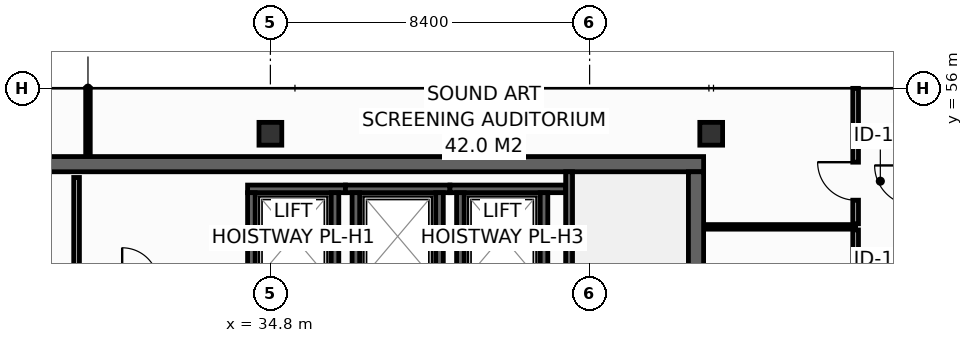
"""IFC4 building model, lengths in metres.
Left out: names, types, materials, properties, quantities, classifications, styles, units other than length and angle.
Written with IfcOpenShell. Run it as: python <this file> out.ifc"""

import sys

from ifc_helpers import new_model, si_unit, direction, frame, frame_2d, origin, origin_2d, place, context, subcontext, project, spatial, rectangle, hollow_rectangle, extrude, element, fill, save


model = new_model("IFC4")
c1 = context("Model", 3, precision=1e-05, world=origin(), true_north=direction((0.0, 1.0)))
c2 = subcontext(c1, "Body", "Model", "MODEL_VIEW")
j1 = project(units=[si_unit("LENGTHUNIT", "METRE"), si_unit("PLANEANGLEUNIT", "RADIAN")], contexts=[c1])
p1 = place(None, origin())
s1 = spatial("IfcSite", under=j1, at=p1, CompositionType="ELEMENT")
p2 = place(p1, origin())
s2 = spatial("IfcBuilding", under=s1, at=p2, CompositionType="ELEMENT")
p3 = place(p2, frame((0.0, 0.0, 287.6)))
s3 = spatial("IfcBuildingStorey", under=s2, at=p3, CompositionType="ELEMENT", Elevation=287.6)
p4 = place(p3, frame((13.7, 54.0, 0.0), z_axis=(0.0, 0.0, 1.0), x_axis=(1.0, 0.0, 0.0)))
e1 = element("IfcWall", 1, at=p4, inside=s3, PredefinedType="SHEAR", context=c2, shape_type="SweptSolid", body=[
    extrude(rectangle(XDim=32.5, YDim=0.4, at=frame_2d((16.25, 0.0))), origin(), (0.0, 0.0, 1.0), 3.55),
])
p5 = place(p3, frame((46.0, 43.4, 0.0), z_axis=(0.0, 0.0, 1.0), x_axis=(0.0, 1.0, 0.0)))
e2 = element("IfcWall", 2, at=p5, inside=s3, PredefinedType="SHEAR", context=c2, shape_type="SweptSolid", body=[
    extrude(rectangle(XDim=10.4, YDim=0.4, at=frame_2d((5.2, 0.0))), origin(), (0.0, 0.0, 1.0), 3.55),
])
for number, where, z_axis, x_axis in (
    (3, (34.8, 54.8, 0.0), (0.0, 0.0, 1.0), (1.0, 0.0, 0.0)),
    (4, (46.4, 54.8, 0.0), (0.0, 0.0, 1.0), (1.0, 0.0, 0.0)),
):
    element("IfcColumn", number, at=place(p3, frame(where, z_axis=z_axis, x_axis=x_axis)), inside=s3, PredefinedType="COLUMN", context=c2, shape_type="SweptSolid", body=[
        extrude(hollow_rectangle(XDim=0.6, YDim=0.6, WallThickness=0.028, at=origin_2d()), origin(), (0.0, 0.0, 1.0), 3.8),
    ])
p6 = place(p3, frame((34.2, 53.35, 0.0), z_axis=(0.0, 0.0, 1.0), x_axis=(1.0, 0.0, 0.0)))
e5 = element("IfcWall", 5, at=p6, inside=s3, PredefinedType="SHEAR", context=c2, shape_type="SweptSolid", body=[
    extrude(rectangle(XDim=2.575, YDim=0.2, at=frame_2d((1.288, 0.0))), origin(), (0.0, 0.0, 1.0), 3.55),
])
for number, where, z_axis, x_axis in (
    (6, (34.3, 50.95, 0.0), (0.0, 0.0, 1.0), (0.0, 1.0, 0.0)),
    (7, (36.5, 50.95, 0.0), (0.0, 0.0, 1.0), (0.0, 1.0, 0.0)),
):
    element("IfcWall", number, at=place(p3, frame(where, z_axis=z_axis, x_axis=x_axis)), inside=s3, PredefinedType="SHEAR", context=c2, shape_type="SweptSolid", body=[
        extrude(rectangle(XDim=2.3, YDim=0.2, at=frame_2d((1.15, 0.0))), origin(), (0.0, 0.0, 1.0), 3.55),
    ])
p7 = place(p3, frame((36.775, 53.35, 0.0), z_axis=(0.0, 0.0, 1.0), x_axis=(1.0, 0.0, 0.0)))
e8 = element("IfcWall", 8, at=p7, inside=s3, PredefinedType="SHEAR", context=c2, shape_type="SweptSolid", body=[
    extrude(rectangle(XDim=2.75, YDim=0.2, at=frame_2d((1.375, 0.0))), origin(), (0.0, 0.0, 1.0), 3.55),
])
for number, where, z_axis, x_axis in (
    (9, (37.05, 50.95, 0.0), (0.0, 0.0, 1.0), (0.0, 1.0, 0.0)),
    (10, (39.25, 50.95, 0.0), (0.0, 0.0, 1.0), (0.0, 1.0, 0.0)),
):
    element("IfcWall", number, at=place(p3, frame(where, z_axis=z_axis, x_axis=x_axis)), inside=s3, PredefinedType="SHEAR", context=c2, shape_type="SweptSolid", body=[
        extrude(rectangle(XDim=2.3, YDim=0.2, at=frame_2d((1.15, 0.0))), origin(), (0.0, 0.0, 1.0), 3.55),
    ])
p8 = place(p3, frame((39.525, 53.35, 0.0), z_axis=(0.0, 0.0, 1.0), x_axis=(1.0, 0.0, 0.0)))
e11 = element("IfcWall", 11, at=p8, inside=s3, PredefinedType="SHEAR", context=c2, shape_type="SweptSolid", body=[
    extrude(rectangle(XDim=3.045, YDim=0.2, at=frame_2d((1.522, 0.0))), origin(), (0.0, 0.0, 1.0), 3.55),
])
for number, where, z_axis, x_axis in (
    (12, (39.8, 50.95, 0.0), (0.0, 0.0, 1.0), (0.0, 1.0, 0.0)),
    (13, (42.0, 50.95, 0.0), (0.0, 0.0, 1.0), (0.0, 1.0, 0.0)),
):
    element("IfcWall", number, at=place(p3, frame(where, z_axis=z_axis, x_axis=x_axis)), inside=s3, PredefinedType="SHEAR", context=c2, shape_type="SweptSolid", body=[
        extrude(rectangle(XDim=2.3, YDim=0.2, at=frame_2d((1.15, 0.0))), origin(), (0.0, 0.0, 1.0), 3.55),
    ])
p9 = place(p3, frame((42.66, 53.8, 0.0), z_axis=(0.0, 0.0, 1.0), x_axis=(0.0, -1.0, 0.0)))
e14 = element("IfcWall", 14, at=p9, inside=s3, PredefinedType="SHEAR", context=c2, shape_type="SweptSolid", body=[
    extrude(rectangle(XDim=10.4, YDim=0.18, at=frame_2d((5.2, 0.0))), origin(), (0.0, 0.0, 1.0), 3.55),
])
p10 = place(p9, frame((8.99, 0.0, 0.0)))
e15 = element("IfcOpeningElement", 15, at=p10, cuts=e14, PredefinedType="OPENING", context=c2, shape_type="SweptSolid", body=[
    extrude(rectangle(XDim=1.1, YDim=2.15, at=frame_2d((0.55, 1.075))), frame((0.0, 0.1, 0.0), z_axis=(0.0, -1.0, 0.0), x_axis=(1.0, 0.0, 0.0)), (0.0, 0.0, 1.0), 0.2),
])
p11 = place(p3, frame((29.7, 50.95, 0.0), z_axis=(0.0, 0.0, 1.0), x_axis=(0.0, 1.0, 0.0)))
e16 = element("IfcWall", 16, at=p11, inside=s3, PredefinedType="PARTITIONING", context=c2, shape_type="SweptSolid", body=[
    extrude(rectangle(XDim=2.7, YDim=0.15, at=frame_2d((1.35, 0.0))), origin(), (0.0, 0.0, 1.0), 3.55),
])
p12 = place(p3, frame((46.22, 52.35, 0.0), z_axis=(0.0, 0.0, 1.0), x_axis=(1.0, 0.0, 0.0)))
e17 = element("IfcWall", 17, at=p12, inside=s3, PredefinedType="PARTITIONING", context=c2, shape_type="SweptSolid", body=[
    extrude(rectangle(XDim=3.98, YDim=0.12, at=frame_2d((1.99, 0.0))), origin(), (0.0, 0.0, 1.0), 3.55),
])
p13 = place(p3, frame((30.0, 54.22, 0.0), z_axis=(0.0, 0.0, 1.0), x_axis=(0.0, 1.0, 0.0)))
e18 = element("IfcWall", 18, at=p13, inside=s3, PredefinedType="PARTITIONING", context=c2, shape_type="SweptSolid", body=[
    extrude(rectangle(XDim=1.775, YDim=0.12, at=frame_2d((0.888, 0.0))), origin(), (0.0, 0.0, 1.0), 2.935),
])
p14 = place(p3, frame((50.2, 48.29, 0.0), z_axis=(0.0, 0.0, 1.0), x_axis=(0.0, 1.0, 0.0)))
e19 = element("IfcWall", 19, at=p14, inside=s3, PredefinedType="PARTITIONING", context=c2, shape_type="SweptSolid", body=[
    extrude(rectangle(XDim=3.98, YDim=0.15, at=frame_2d((1.99, 0.0))), origin(), (0.0, 0.0, 1.0), 3.55),
])
p15 = place(p14, frame((1.49, 0.0, 0.0)))
e20 = element("IfcOpeningElement", 20, at=p15, cuts=e19, PredefinedType="OPENING", context=c2, shape_type="SweptSolid", body=[
    extrude(rectangle(XDim=1.0, YDim=2.15, at=frame_2d((0.5, 1.075))), frame((0.0, 0.085, 0.0), z_axis=(0.0, -1.0, 0.0), x_axis=(1.0, 0.0, 0.0)), (0.0, 0.0, 1.0), 0.17),
])
p16 = place(p3, frame((50.2, 52.43, 0.0), z_axis=(0.0, 0.0, 1.0), x_axis=(0.0, 1.0, 0.0)))
e21 = element("IfcWall", 21, at=p16, inside=s3, PredefinedType="PARTITIONING", context=c2, shape_type="SweptSolid", body=[
    extrude(rectangle(XDim=3.565, YDim=0.15, at=frame_2d((1.783, 0.0))), origin(), (0.0, 0.0, 1.0), 2.935),
])
p17 = place(p16, frame((0.622, 0.0, 0.0)))
e22 = element("IfcOpeningElement", 22, at=p17, cuts=e21, PredefinedType="OPENING", context=c2, shape_type="SweptSolid", body=[
    extrude(rectangle(XDim=1.0, YDim=2.15, at=frame_2d((0.5, 1.075))), frame((0.0, 0.085, 0.0), z_axis=(0.0, -1.0, 0.0), x_axis=(1.0, 0.0, 0.0)), (0.0, 0.0, 1.0), 0.17),
])
p18 = place(p17, origin())
e23 = element("IfcDoor", 23, at=p18, inside=s3, OperationType="SINGLE_SWING_RIGHT", PredefinedType="DOOR", context=c2, shape_type="SweptSolid", body=[
    extrude(rectangle(XDim=1.0, YDim=2.15, at=frame_2d((0.5, 1.075))), frame((0.0, 0.025, 0.0), z_axis=(0.0, -1.0, 0.0), x_axis=(1.0, 0.0, 0.0)), (0.0, 0.0, 1.0), 0.05),
])
fill(e22, e23)
save(model, sys.argv[1])
